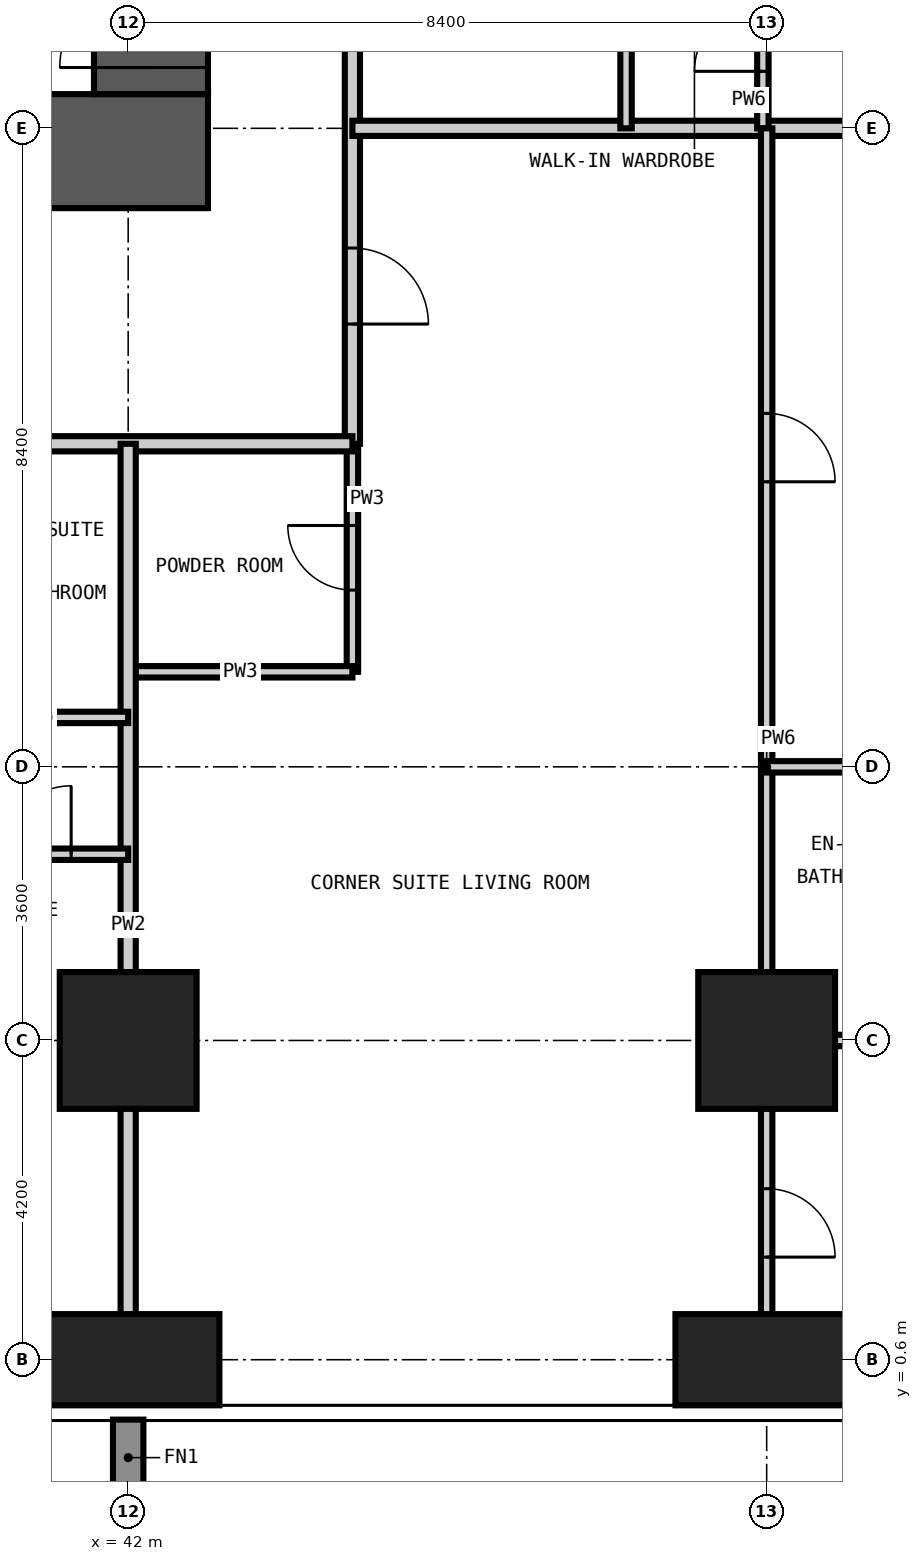
"""IFC4 building model, lengths in metres.
Left out: names, types, materials, properties, quantities, classifications, styles, units other than length and angle.
Written with IfcOpenShell. Run it as: python <this file> out.ifc"""

import sys

from ifc_helpers import new_model, si_unit, direction, frame, frame_2d, origin, origin_2d, place, context, subcontext, project, spatial, rectangle, extrude, element, fill, save


model = new_model("IFC4")
c1 = context("Model", 3, precision=1e-05, world=origin(), true_north=direction((0.0, 1.0)))
c2 = subcontext(c1, "Body", "Model", "MODEL_VIEW")
j1 = project(units=[si_unit("LENGTHUNIT", "METRE"), si_unit("PLANEANGLEUNIT", "RADIAN")], contexts=[c1])
p1 = place(None, origin())
s1 = spatial("IfcSite", under=j1, at=p1, CompositionType="ELEMENT")
p2 = place(p1, origin())
s2 = spatial("IfcBuilding", under=s1, at=p2, CompositionType="ELEMENT")
p3 = place(p2, frame((0.0, 0.0, 70.2)))
s3 = spatial("IfcBuildingStorey", under=s2, at=p3, CompositionType="ELEMENT", Elevation=70.2)
p4 = place(p3, frame((42.0, 0.6, -0.35), z_axis=(0.0, 0.0, 1.0), x_axis=(1.0, 0.0, 0.0)))
e1 = element("IfcColumn", 1, at=p4, inside=s3, PredefinedType="COLUMN", context=c2, shape_type="SweptSolid", body=[
    extrude(rectangle(XDim=2.4, YDim=1.2, at=origin_2d()), origin(), (0.0, 0.0, 1.0), 3.6),
])
p5 = place(p3, frame((42.0, 4.8, -0.35), z_axis=(0.0, 0.0, 1.0), x_axis=(1.0, 0.0, 0.0)))
e2 = element("IfcColumn", 2, at=p5, inside=s3, PredefinedType="COLUMN", context=c2, shape_type="SweptSolid", body=[
    extrude(rectangle(XDim=1.8, YDim=1.8, at=origin_2d()), origin(), (0.0, 0.0, 1.0), 3.6),
])
p6 = place(p3, frame((50.4, 0.6, -0.35), z_axis=(0.0, 0.0, 1.0), x_axis=(1.0, 0.0, 0.0)))
e3 = element("IfcColumn", 3, at=p6, inside=s3, PredefinedType="COLUMN", context=c2, shape_type="SweptSolid", body=[
    extrude(rectangle(XDim=2.4, YDim=1.2, at=origin_2d()), origin(), (0.0, 0.0, 1.0), 3.6),
])
p7 = place(p3, frame((50.4, 4.8, -0.35), z_axis=(0.0, 0.0, 1.0), x_axis=(1.0, 0.0, 0.0)))
e4 = element("IfcColumn", 4, at=p7, inside=s3, PredefinedType="COLUMN", context=c2, shape_type="SweptSolid", body=[
    extrude(rectangle(XDim=1.8, YDim=1.8, at=origin_2d()), origin(), (0.0, 0.0, 1.0), 3.6),
])
p8 = place(p3, frame((15.75, 16.5, -0.35), z_axis=(0.0, 0.0, 1.0), x_axis=(1.0, 0.0, 0.0)))
e5 = element("IfcWall", 5, at=p8, inside=s3, PredefinedType="SHEAR", context=c2, shape_type="SweptSolid", body=[
    extrude(rectangle(XDim=27.3, YDim=1.5, at=frame_2d((13.65, 0.0))), origin(), (0.0, 0.0, 1.0), 3.6),
])
p9 = place(p8, frame((13.15, 0.0, 0.35)))
e6 = element("IfcOpeningElement", 6, at=p9, cuts=e5, PredefinedType="OPENING", context=c2, shape_type="SweptSolid", body=[
    extrude(rectangle(XDim=1.0, YDim=2.1, at=frame_2d((0.5, 1.05))), frame((0.0, 0.76, 0.0), z_axis=(0.0, -1.0, 0.0), x_axis=(1.0, 0.0, 0.0)), (0.0, 0.0, 1.0), 1.52),
])
p10 = place(p8, frame((19.45, 0.0, 0.35)))
e7 = element("IfcOpeningElement", 7, at=p10, cuts=e5, PredefinedType="OPENING", context=c2, shape_type="SweptSolid", body=[
    extrude(rectangle(XDim=1.0, YDim=2.1, at=frame_2d((0.5, 1.05))), frame((0.0, 0.76, 0.0), z_axis=(0.0, -1.0, 0.0), x_axis=(1.0, 0.0, 0.0)), (0.0, 0.0, 1.0), 1.52),
])
p11 = place(p3, frame((42.3, 17.25, -0.35), z_axis=(0.0, 0.0, 1.0), x_axis=(0.0, 1.0, 0.0)))
e8 = element("IfcWall", 8, at=p11, inside=s3, PredefinedType="SHEAR", context=c2, shape_type="SweptSolid", body=[
    extrude(rectangle(XDim=24.3, YDim=1.5, at=frame_2d((12.15, 0.0))), origin(), (0.0, 0.0, 1.0), 3.6),
])
p12 = place(p11, frame((0.35, 0.0, 0.35)))
e9 = element("IfcOpeningElement", 9, at=p12, cuts=e8, PredefinedType="OPENING", context=c2, shape_type="SweptSolid", body=[
    extrude(rectangle(XDim=1.2, YDim=2.2, at=frame_2d((0.6, 1.1))), frame((0.0, 0.76, 0.0), z_axis=(0.0, -1.0, 0.0), x_axis=(1.0, 0.0, 0.0)), (0.0, 0.0, 1.0), 1.52),
])
p13 = place(p11, frame((11.65, 0.0, 0.35)))
e10 = element("IfcOpeningElement", 10, at=p13, cuts=e8, PredefinedType="OPENING", context=c2, shape_type="SweptSolid", body=[
    extrude(rectangle(XDim=1.0, YDim=2.1, at=frame_2d((0.5, 1.05))), frame((0.0, 0.76, 0.0), z_axis=(0.0, -1.0, 0.0), x_axis=(1.0, 0.0, 0.0)), (0.0, 0.0, 1.0), 1.52),
])
p14 = place(p11, frame((20.05, 0.0, 0.35)))
e11 = element("IfcOpeningElement", 11, at=p14, cuts=e8, PredefinedType="OPENING", context=c2, shape_type="SweptSolid", body=[
    extrude(rectangle(XDim=1.0, YDim=2.1, at=frame_2d((0.5, 1.05))), frame((0.0, 0.76, 0.0), z_axis=(0.0, -1.0, 0.0), x_axis=(1.0, 0.0, 0.0)), (0.0, 0.0, 1.0), 1.52),
])
p15 = place(p3, frame((44.95, 9.65, 0.0), z_axis=(0.0, 0.0, 1.0), x_axis=(0.0, 1.0, 0.0)))
e12 = element("IfcWall", 12, at=p15, inside=s3, PredefinedType="PARTITIONING", context=c2, shape_type="SweptSolid", body=[
    extrude(rectangle(XDim=3.0, YDim=0.15, at=frame_2d((1.5, 0.0))), origin(), (0.0, 0.0, 1.0), 3.25),
])
p16 = place(p15, frame((1.075, 0.0, 0.0)))
e13 = element("IfcOpeningElement", 13, at=p16, cuts=e12, PredefinedType="OPENING", context=c2, shape_type="SweptSolid", body=[
    extrude(rectangle(XDim=0.85, YDim=2.1, at=frame_2d((0.425, 1.05))), frame((0.0, 0.085, 0.0), z_axis=(0.0, -1.0, 0.0), x_axis=(1.0, 0.0, 0.0)), (0.0, 0.0, 1.0), 0.17),
])
p17 = place(p3, frame((50.4, 4.8, 0.0), z_axis=(0.0, 0.0, 1.0), x_axis=(1.0, 0.0, 0.0)))
e14 = element("IfcWall", 14, at=p17, inside=s3, PredefinedType="PARTITIONING", context=c2, shape_type="SweptSolid", body=[
    extrude(rectangle(XDim=3.0, YDim=0.15, at=frame_2d((1.5, 0.0))), origin(), (0.0, 0.0, 1.0), 3.25),
])
p18 = place(p3, frame((42.0, 9.65, 0.0), z_axis=(0.0, 0.0, 1.0), x_axis=(1.0, 0.0, 0.0)))
e15 = element("IfcWall", 15, at=p18, inside=s3, PredefinedType="PARTITIONING", context=c2, shape_type="SweptSolid", body=[
    extrude(rectangle(XDim=2.95, YDim=0.15, at=frame_2d((1.475, 0.0))), origin(), (0.0, 0.0, 1.0), 3.25),
])
p19 = place(p3, frame((44.95, 45.55, 0.0), z_axis=(0.0, 0.0, 1.0), x_axis=(0.0, -1.0, 0.0)))
e16 = element("IfcWall", 16, at=p19, inside=s3, PredefinedType="PARTITIONING", context=c2, shape_type="SweptSolid", body=[
    extrude(rectangle(XDim=32.9, YDim=0.2, at=frame_2d((16.45, 0.0))), origin(), (0.0, 0.0, 1.0), 3.25),
])
p20 = place(p19, frame((24.95, 0.0, 0.0)))
e17 = element("IfcOpeningElement", 17, at=p20, cuts=e16, PredefinedType="OPENING", context=c2, shape_type="SweptSolid", body=[
    extrude(rectangle(XDim=1.0, YDim=2.2, at=frame_2d((0.5, 1.1))), frame((0.0, 0.11, 0.0), z_axis=(0.0, -1.0, 0.0), x_axis=(1.0, 0.0, 0.0)), (0.0, 0.0, 1.0), 0.22),
])
p21 = place(p19, frame((21.05, 0.0, 0.0)))
e18 = element("IfcOpeningElement", 18, at=p21, cuts=e16, PredefinedType="OPENING", context=c2, shape_type="SweptSolid", body=[
    extrude(rectangle(XDim=1.0, YDim=2.2, at=frame_2d((0.5, 1.1))), frame((0.0, 0.11, 0.0), z_axis=(0.0, -1.0, 0.0), x_axis=(1.0, 0.0, 0.0)), (0.0, 0.0, 1.0), 0.22),
])
p22 = place(p19, frame((10.25, 0.0, 0.0)))
e19 = element("IfcOpeningElement", 19, at=p22, cuts=e16, PredefinedType="OPENING", context=c2, shape_type="SweptSolid", body=[
    extrude(rectangle(XDim=1.0, YDim=2.2, at=frame_2d((0.5, 1.1))), frame((0.0, 0.11, 0.0), z_axis=(0.0, -1.0, 0.0), x_axis=(1.0, 0.0, 0.0)), (0.0, 0.0, 1.0), 0.22),
])
p23 = place(p19, frame((6.35, 0.0, 0.0)))
e20 = element("IfcOpeningElement", 20, at=p23, cuts=e16, PredefinedType="OPENING", context=c2, shape_type="SweptSolid", body=[
    extrude(rectangle(XDim=1.0, YDim=2.2, at=frame_2d((0.5, 1.1))), frame((0.0, 0.11, 0.0), z_axis=(0.0, -1.0, 0.0), x_axis=(1.0, 0.0, 0.0)), (0.0, 0.0, 1.0), 0.22),
])
p24 = place(p19, frame((30.325, 0.0, 0.0)))
e21 = element("IfcOpeningElement", 21, at=p24, cuts=e16, PredefinedType="OPENING", context=c2, shape_type="SweptSolid", body=[
    extrude(rectangle(XDim=1.0, YDim=2.2, at=frame_2d((0.5, 1.1))), frame((0.0, 0.11, 0.0), z_axis=(0.0, -1.0, 0.0), x_axis=(1.0, 0.0, 0.0)), (0.0, 0.0, 1.0), 0.22),
])
p25 = place(p19, frame((1.275, 0.0, 0.0)))
e22 = element("IfcOpeningElement", 22, at=p25, cuts=e16, PredefinedType="OPENING", context=c2, shape_type="SweptSolid", body=[
    extrude(rectangle(XDim=1.0, YDim=2.2, at=frame_2d((0.5, 1.1))), frame((0.0, 0.11, 0.0), z_axis=(0.0, -1.0, 0.0), x_axis=(1.0, 0.0, 0.0)), (0.0, 0.0, 1.0), 0.22),
])
p26 = place(p3, frame((44.95, 12.65, 0.0), z_axis=(0.0, 0.0, 1.0), x_axis=(-1.0, 0.0, 0.0)))
e23 = element("IfcWall", 23, at=p26, inside=s3, PredefinedType="PARTITIONING", context=c2, shape_type="SweptSolid", body=[
    extrude(rectangle(XDim=32.3, YDim=0.2, at=frame_2d((16.15, 0.0))), origin(), (0.0, 0.0, 1.0), 3.25),
])
p27 = place(p26, frame((24.35, 0.0, 0.0)))
e24 = element("IfcOpeningElement", 24, at=p27, cuts=e23, PredefinedType="OPENING", context=c2, shape_type="SweptSolid", body=[
    extrude(rectangle(XDim=1.0, YDim=2.2, at=frame_2d((0.5, 1.1))), frame((0.0, 0.11, 0.0), z_axis=(0.0, -1.0, 0.0), x_axis=(1.0, 0.0, 0.0)), (0.0, 0.0, 1.0), 0.22),
])
p28 = place(p26, frame((22.55, 0.0, 0.0)))
e25 = element("IfcOpeningElement", 25, at=p28, cuts=e23, PredefinedType="OPENING", context=c2, shape_type="SweptSolid", body=[
    extrude(rectangle(XDim=1.0, YDim=2.2, at=frame_2d((0.5, 1.1))), frame((0.0, 0.11, 0.0), z_axis=(0.0, -1.0, 0.0), x_axis=(1.0, 0.0, 0.0)), (0.0, 0.0, 1.0), 0.22),
])
p29 = place(p26, frame((15.95, 0.0, 0.0)))
e26 = element("IfcOpeningElement", 26, at=p29, cuts=e23, PredefinedType="OPENING", context=c2, shape_type="SweptSolid", body=[
    extrude(rectangle(XDim=1.0, YDim=2.2, at=frame_2d((0.5, 1.1))), frame((0.0, 0.11, 0.0), z_axis=(0.0, -1.0, 0.0), x_axis=(1.0, 0.0, 0.0)), (0.0, 0.0, 1.0), 0.22),
])
p30 = place(p26, frame((14.15, 0.0, 0.0)))
e27 = element("IfcOpeningElement", 27, at=p30, cuts=e23, PredefinedType="OPENING", context=c2, shape_type="SweptSolid", body=[
    extrude(rectangle(XDim=1.0, YDim=2.2, at=frame_2d((0.5, 1.1))), frame((0.0, 0.11, 0.0), z_axis=(0.0, -1.0, 0.0), x_axis=(1.0, 0.0, 0.0)), (0.0, 0.0, 1.0), 0.22),
])
p31 = place(p26, frame((7.55, 0.0, 0.0)))
e28 = element("IfcOpeningElement", 28, at=p31, cuts=e23, PredefinedType="OPENING", context=c2, shape_type="SweptSolid", body=[
    extrude(rectangle(XDim=1.0, YDim=2.2, at=frame_2d((0.5, 1.1))), frame((0.0, 0.11, 0.0), z_axis=(0.0, -1.0, 0.0), x_axis=(1.0, 0.0, 0.0)), (0.0, 0.0, 1.0), 0.22),
])
p32 = place(p26, frame((5.75, 0.0, 0.0)))
e29 = element("IfcOpeningElement", 29, at=p32, cuts=e23, PredefinedType="OPENING", context=c2, shape_type="SweptSolid", body=[
    extrude(rectangle(XDim=1.0, YDim=2.2, at=frame_2d((0.5, 1.1))), frame((0.0, 0.11, 0.0), z_axis=(0.0, -1.0, 0.0), x_axis=(1.0, 0.0, 0.0)), (0.0, 0.0, 1.0), 0.22),
])
p33 = place(p3, frame((42.0, -0.008, 0.0), z_axis=(0.0, 0.0, 1.0), x_axis=(0.0, 1.0, 0.0)))
e30 = element("IfcWall", 30, at=p33, inside=s3, PredefinedType="PARTITIONING", context=c2, shape_type="SweptSolid", body=[
    extrude(rectangle(XDim=12.658, YDim=0.2, at=frame_2d((6.329, 0.0))), origin(), (0.0, 0.0, 1.0), 3.25),
])
p34 = place(p3, frame((44.95, 16.8, 0.0), z_axis=(0.0, 0.0, 1.0), x_axis=(1.0, 0.0, 0.0)))
e31 = element("IfcWall", 31, at=p34, inside=s3, PredefinedType="PARTITIONING", context=c2, shape_type="SweptSolid", body=[
    extrude(rectangle(XDim=5.4, YDim=0.2, at=frame_2d((2.7, 0.0))), origin(), (0.0, 0.0, 1.0), 3.25),
])
p35 = place(p3, frame((50.4, 16.8, 0.0), z_axis=(0.0, 0.0, 1.0), x_axis=(1.0, 0.0, 0.0)))
e32 = element("IfcWall", 32, at=p35, inside=s3, PredefinedType="PARTITIONING", context=c2, shape_type="SweptSolid", body=[
    extrude(rectangle(XDim=8.408, YDim=0.2, at=frame_2d((4.204, 0.0))), origin(), (0.0, 0.0, 1.0), 3.25),
])
p36 = place(p3, frame((48.55, 16.8, 0.0), z_axis=(0.0, 0.0, 1.0), x_axis=(0.0, 1.0, 0.0)))
e33 = element("IfcWall", 33, at=p36, inside=s3, PredefinedType="PARTITIONING", context=c2, shape_type="SweptSolid", body=[
    extrude(rectangle(XDim=2.4, YDim=0.15, at=frame_2d((1.2, 0.0))), origin(), (0.0, 0.0, 1.0), 3.25),
])
p37 = place(p3, frame((50.35, 16.8, 0.0), z_axis=(0.0, 0.0, 1.0), x_axis=(0.0, 1.0, 0.0)))
e34 = element("IfcWall", 34, at=p37, inside=s3, PredefinedType="PARTITIONING", context=c2, shape_type="SweptSolid", body=[
    extrude(rectangle(XDim=2.4, YDim=0.15, at=frame_2d((1.2, 0.0))), origin(), (0.0, 0.0, 1.0), 3.25),
])
p38 = place(p37, frame((0.75, 0.0, 0.0)))
e35 = element("IfcOpeningElement", 35, at=p38, cuts=e34, PredefinedType="OPENING", context=c2, shape_type="SweptSolid", body=[
    extrude(rectangle(XDim=0.9, YDim=2.1, at=frame_2d((0.45, 1.05))), frame((0.0, 0.085, 0.0), z_axis=(0.0, -1.0, 0.0), x_axis=(1.0, 0.0, 0.0)), (0.0, 0.0, 1.0), 0.17),
])
p39 = place(p3, frame((50.4, -0.008, 0.0), z_axis=(0.0, 0.0, 1.0), x_axis=(0.0, 1.0, 0.0)))
e36 = element("IfcWall", 36, at=p39, inside=s3, PredefinedType="PARTITIONING", context=c2, shape_type="SweptSolid", body=[
    extrude(rectangle(XDim=16.808, YDim=0.15, at=frame_2d((8.404, 0.0))), origin(), (0.0, 0.0, 1.0), 3.25),
])
p40 = place(p39, frame((1.958, 0.0, 0.0)))
e37 = element("IfcOpeningElement", 37, at=p40, cuts=e36, PredefinedType="OPENING", context=c2, shape_type="SweptSolid", body=[
    extrude(rectangle(XDim=0.9, YDim=2.1, at=frame_2d((0.45, 1.05))), frame((0.0, 0.085, 0.0), z_axis=(0.0, -1.0, 0.0), x_axis=(1.0, 0.0, 0.0)), (0.0, 0.0, 1.0), 0.17),
])
p41 = place(p39, frame((12.158, 0.0, 0.0)))
e38 = element("IfcOpeningElement", 38, at=p41, cuts=e36, PredefinedType="OPENING", context=c2, shape_type="SweptSolid", body=[
    extrude(rectangle(XDim=0.9, YDim=2.1, at=frame_2d((0.45, 1.05))), frame((0.0, 0.085, 0.0), z_axis=(0.0, -1.0, 0.0), x_axis=(1.0, 0.0, 0.0)), (0.0, 0.0, 1.0), 0.17),
])
p42 = place(p3, frame((39.6, 7.25, 0.0), z_axis=(0.0, 0.0, 1.0), x_axis=(1.0, 0.0, 0.0)))
e39 = element("IfcWall", 39, at=p42, inside=s3, PredefinedType="PARTITIONING", context=c2, shape_type="SweptSolid", body=[
    extrude(rectangle(XDim=2.4, YDim=0.15, at=frame_2d((1.2, 0.0))), origin(), (0.0, 0.0, 1.0), 3.25),
])
p43 = place(p42, frame((0.75, 0.0, 0.0)))
e40 = element("IfcOpeningElement", 40, at=p43, cuts=e39, PredefinedType="OPENING", context=c2, shape_type="SweptSolid", body=[
    extrude(rectangle(XDim=0.9, YDim=2.1, at=frame_2d((0.45, 1.05))), frame((0.0, 0.085, 0.0), z_axis=(0.0, -1.0, 0.0), x_axis=(1.0, 0.0, 0.0)), (0.0, 0.0, 1.0), 0.17),
])
p44 = place(p3, frame((50.4, 8.4, 0.0), z_axis=(0.0, 0.0, 1.0), x_axis=(1.0, 0.0, 0.0)))
e41 = element("IfcWall", 41, at=p44, inside=s3, PredefinedType="PARTITIONING", context=c2, shape_type="SweptSolid", body=[
    extrude(rectangle(XDim=8.408, YDim=0.15, at=frame_2d((4.204, 0.0))), origin(), (0.0, 0.0, 1.0), 3.25),
])
p45 = place(p44, frame((4.55, 0.0, 0.0)))
e42 = element("IfcOpeningElement", 42, at=p45, cuts=e41, PredefinedType="OPENING", context=c2, shape_type="SweptSolid", body=[
    extrude(rectangle(XDim=0.9, YDim=2.1, at=frame_2d((0.45, 1.05))), frame((0.0, 0.085, 0.0), z_axis=(0.0, -1.0, 0.0), x_axis=(1.0, 0.0, 0.0)), (0.0, 0.0, 1.0), 0.17),
])
p46 = place(p3, frame((39.6, 9.05, 0.0), z_axis=(0.0, 0.0, 1.0), x_axis=(1.0, 0.0, 0.0)))
e43 = element("IfcWall", 43, at=p46, inside=s3, PredefinedType="PARTITIONING", context=c2, shape_type="SweptSolid", body=[
    extrude(rectangle(XDim=2.4, YDim=0.15, at=frame_2d((1.2, 0.0))), origin(), (0.0, 0.0, 1.0), 3.25),
])
p47 = place(p12, origin())
e44 = element("IfcDoor", 44, at=p47, inside=s3, OperationType="SINGLE_SWING_LEFT", PredefinedType="DOOR", context=c2, shape_type="SweptSolid", body=[
    extrude(rectangle(XDim=1.2, YDim=2.2, at=frame_2d((0.6, 1.1))), frame((0.0, 0.025, 0.0), z_axis=(0.0, -1.0, 0.0), x_axis=(1.0, 0.0, 0.0)), (0.0, 0.0, 1.0), 0.05),
])
fill(e9, e44)
p48 = place(p43, origin())
e45 = element("IfcDoor", 45, at=p48, inside=s3, OperationType="SINGLE_SWING_RIGHT", PredefinedType="DOOR", context=c2, shape_type="SweptSolid", body=[
    extrude(rectangle(XDim=0.9, YDim=2.1, at=frame_2d((0.45, 1.05))), frame((0.0, 0.025, 0.0), z_axis=(0.0, -1.0, 0.0), x_axis=(1.0, 0.0, 0.0)), (0.0, 0.0, 1.0), 0.05),
])
fill(e40, e45)
p49 = place(p38, origin())
e46 = element("IfcDoor", 46, at=p49, inside=s3, OperationType="SINGLE_SWING_LEFT", PredefinedType="DOOR", context=c2, shape_type="SweptSolid", body=[
    extrude(rectangle(XDim=0.9, YDim=2.1, at=frame_2d((0.45, 1.05))), frame((0.0, 0.025, 0.0), z_axis=(0.0, -1.0, 0.0), x_axis=(1.0, 0.0, 0.0)), (0.0, 0.0, 1.0), 0.05),
])
fill(e35, e46)
p50 = place(p24, origin())
e47 = element("IfcDoor", 47, at=p50, inside=s3, OperationType="SINGLE_SWING_RIGHT", PredefinedType="DOOR", context=c2, shape_type="SweptSolid", body=[
    extrude(rectangle(XDim=1.0, YDim=2.2, at=frame_2d((0.5, 1.1))), frame((0.0, 0.025, 0.0), z_axis=(0.0, -1.0, 0.0), x_axis=(1.0, 0.0, 0.0)), (0.0, 0.0, 1.0), 0.05),
])
fill(e21, e47)
p51 = place(p16, origin())
e48 = element("IfcDoor", 48, at=p51, inside=s3, OperationType="SINGLE_SWING_RIGHT", PredefinedType="DOOR", context=c2, shape_type="SweptSolid", body=[
    extrude(rectangle(XDim=0.85, YDim=2.1, at=frame_2d((0.425, 1.05))), frame((0.0, 0.025, 0.0), z_axis=(0.0, -1.0, 0.0), x_axis=(1.0, 0.0, 0.0)), (0.0, 0.0, 1.0), 0.05),
])
fill(e13, e48)
p52 = place(p40, frame((0.9, 0.0, 0.0), z_axis=(0.0, 0.0, 1.0), x_axis=(-1.0, 0.0, 0.0)))
e49 = element("IfcDoor", 49, at=p52, inside=s3, OperationType="SINGLE_SWING_RIGHT", PredefinedType="DOOR", context=c2, shape_type="SweptSolid", body=[
    extrude(rectangle(XDim=0.9, YDim=2.1, at=frame_2d((0.45, 1.05))), frame((0.0, 0.025, 0.0), z_axis=(0.0, -1.0, 0.0), x_axis=(1.0, 0.0, 0.0)), (0.0, 0.0, 1.0), 0.05),
])
fill(e37, e49)
p53 = place(p41, frame((0.9, 0.0, 0.0), z_axis=(0.0, 0.0, 1.0), x_axis=(-1.0, 0.0, 0.0)))
e50 = element("IfcDoor", 50, at=p53, inside=s3, OperationType="SINGLE_SWING_RIGHT", PredefinedType="DOOR", context=c2, shape_type="SweptSolid", body=[
    extrude(rectangle(XDim=0.9, YDim=2.1, at=frame_2d((0.45, 1.05))), frame((0.0, 0.025, 0.0), z_axis=(0.0, -1.0, 0.0), x_axis=(1.0, 0.0, 0.0)), (0.0, 0.0, 1.0), 0.05),
])
fill(e38, e50)
save(model, sys.argv[1])
